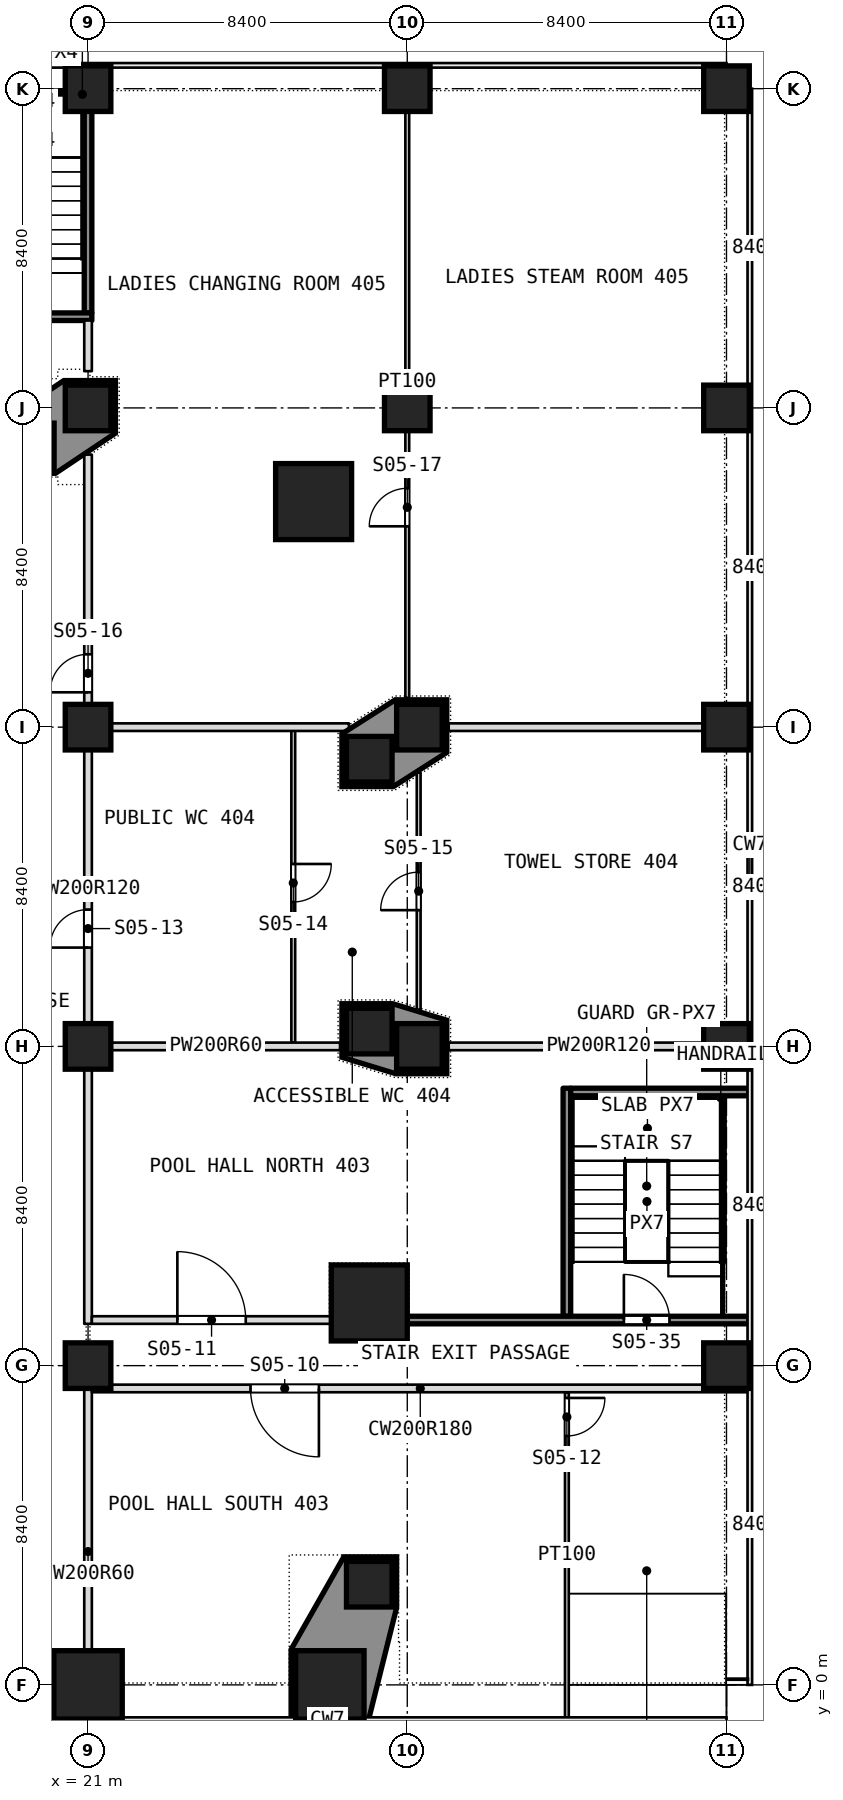
"""IFC4 building model, lengths in metres.
Left out: names, types, materials, properties, quantities, classifications, styles, units other than length and angle.
Written with IfcOpenShell. Run it as: python <this file> out.ifc"""

import sys

from ifc_helpers import new_model, si_unit, direction, frame, frame_2d, origin, origin_2d, place, context, subcontext, project, spatial, polyline, rectangle, outline, extrude, element, fill, save


model = new_model("IFC4")
c1 = context("Model", 3, precision=1e-05, world=origin(), true_north=direction((0.0, 1.0)))
c2 = subcontext(c1, "Body", "Model", "MODEL_VIEW")
j1 = project(units=[si_unit("LENGTHUNIT", "METRE"), si_unit("PLANEANGLEUNIT", "RADIAN")], contexts=[c1])
p1 = place(None, origin())
s1 = spatial("IfcSite", under=j1, at=p1, CompositionType="ELEMENT")
p2 = place(p1, origin())
s2 = spatial("IfcBuilding", under=s1, at=p2, CompositionType="ELEMENT")
p3 = place(p2, frame((0.0, 0.0, 26.0)))
s3 = spatial("IfcBuildingStorey", under=s2, at=p3, CompositionType="ELEMENT", Elevation=26.0)
p4 = place(p3, frame((21.0, 0.0, 0.0), z_axis=(0.0, 0.0, 1.0), x_axis=(1.0, 0.0, 0.0)))
e1 = element("IfcColumn", 1, at=p4, inside=s3, PredefinedType="COLUMN", context=c2, shape_type="SweptSolid", body=[
    extrude(rectangle(XDim=1.8, YDim=1.8, at=origin_2d()), origin(), (0.0, 0.0, 1.0), 5.0),
])
for number, where, z_axis, x_axis in (
    (2, (21.0, 8.4, 0.0), (0.0, 0.0, 1.0), (1.0, 0.0, 0.0)),
    (3, (37.8, 8.4, 0.0), (0.0, 0.0, 1.0), (1.0, 0.0, 0.0)),
    (4, (21.0, 16.8, 0.0), (0.0, 0.0, 1.0), (1.0, 0.0, 0.0)),
    (5, (29.72, 16.8, 0.0), (0.0, 0.0, 1.0), (1.0, 0.0, 0.0)),
    (6, (37.8, 16.8, 0.0), (0.0, 0.0, 1.0), (1.0, 0.0, 0.0)),
    (7, (21.0, 25.2, 0.0), (0.0, 0.0, 1.0), (1.0, 0.0, 0.0)),
    (8, (29.72, 25.2, 0.0), (0.0, 0.0, 1.0), (1.0, 0.0, 0.0)),
    (9, (37.8, 25.2, 0.0), (0.0, 0.0, 1.0), (1.0, 0.0, 0.0)),
    (10, (21.0, 33.6, 0.0), (0.0, 0.0, 1.0), (1.0, 0.0, 0.0)),
    (11, (29.4, 33.6, 0.0), (0.0, 0.0, 1.0), (1.0, 0.0, 0.0)),
    (12, (37.8, 33.6, 0.0), (0.0, 0.0, 1.0), (1.0, 0.0, 0.0)),
    (13, (21.0, 42.0, 0.0), (0.0, 0.0, 1.0), (1.0, 0.0, 0.0)),
    (14, (29.4, 42.0, 0.0), (0.0, 0.0, 1.0), (1.0, 0.0, 0.0)),
    (15, (37.8, 42.0, 0.0), (0.0, 0.0, 1.0), (1.0, 0.0, 0.0)),
):
    element("IfcColumn", number, at=place(p3, frame(where, z_axis=z_axis, x_axis=x_axis)), inside=s3, PredefinedType="COLUMN", context=c2, shape_type="SweptSolid", body=[
        extrude(rectangle(XDim=1.2, YDim=1.2, at=origin_2d()), origin(), (0.0, 0.0, 1.0), 5.0),
    ])
p5 = place(p3, frame((27.363, 0.0, 0.0), z_axis=(0.0, 0.0, 1.0), x_axis=(1.0, 0.0, 0.0)))
e16 = element("IfcColumn", 16, at=p5, inside=s3, PredefinedType="COLUMN", context=c2, shape_type="SweptSolid", body=[
    extrude(rectangle(XDim=1.8, YDim=1.8, at=origin_2d()), origin(), (0.0, 0.0, 1.0), 5.0),
])
for number, where, z_axis, x_axis in (
    (17, (28.4, 10.05, 0.0), (0.0, 0.0, 1.0), (1.0, 0.0, 0.0)),
    (18, (26.936, 31.135, 0.0), (0.0, 0.0, 1.0), (1.0, 0.0, 0.0)),
):
    element("IfcColumn", number, at=place(p3, frame(where, z_axis=z_axis, x_axis=x_axis)), inside=s3, PredefinedType="COLUMN", context=c2, shape_type="SweptSolid", body=[
        extrude(rectangle(XDim=2.0, YDim=2.0, at=origin_2d()), origin(), (0.0, 0.0, 1.0), 5.0),
    ])
p6 = place(p3, frame((37.8, 2.4, 0.0), z_axis=(1.0, 0.0, 0.0), x_axis=(0.0, 0.0, 1.0)))
e19 = element("IfcWall", 19, at=p6, inside=s3, PredefinedType="SOLIDWALL", context=c2, shape_type="SweptSolid", body=[
    extrude(outline(polyline([(0.0, 0.0), (4.68, 0.0), (4.68, 21.6), (0.0, 21.6), (0.0, 16.321), (0.541, 15.6), (1.199, 14.4), (1.65, 13.2), (1.913, 12.0), (2.0, 10.8), (1.913, 9.6), (1.65, 8.4), (1.199, 7.2), (0.541, 6.0), (0.0, 5.279), (0.0, 0.0)])), origin(), (0.0, 0.0, -1.0), 4.2),
])
for number, where, z_axis, x_axis in (
    (20, (19.507, 32.6, 0.0), (0.0, 0.0, 1.0), (1.0, 0.0, 0.0)),
    (21, (28.4, 24.356, 0.0), (0.0, 0.0, 1.0), (1.0, 0.0, 0.0)),
    (22, (28.4, 17.203, 0.0), (0.0, 0.0, 1.0), (1.0, 0.0, 0.0)),
    (23, (28.4, 2.649, 0.0), (0.0, 0.0, 1.0), (1.0, 0.0, 0.0)),
):
    element("IfcColumn", number, at=place(p3, frame(where, z_axis=z_axis, x_axis=x_axis)), inside=s3, PredefinedType="COLUMN", context=c2, shape_type="SweptSolid", body=[
        extrude(rectangle(XDim=1.2, YDim=1.2, at=origin_2d()), origin(), (0.0, 0.0, 1.0), 5.0),
    ])
p7 = place(p3, frame((33.6, 9.7, 0.0), z_axis=(0.0, 0.0, 1.0), x_axis=(0.0, 1.0, 0.0)))
e24 = element("IfcWall", 24, at=p7, inside=s3, PredefinedType="PARTITIONING", context=c2, shape_type="SweptSolid", body=[
    extrude(rectangle(XDim=6.0, YDim=0.2, at=frame_2d((3.0, 0.0))), origin(), (0.0, 0.0, 1.0), 4.68),
])
p8 = place(p3, frame((33.6, -0.884, 0.0), z_axis=(0.0, 0.0, 1.0), x_axis=(0.0, 1.0, 0.0)))
e25 = element("IfcWall", 25, at=p8, inside=s3, PredefinedType="PARTITIONING", context=c2, shape_type="SweptSolid", body=[
    extrude(rectangle(XDim=8.584, YDim=0.1, at=frame_2d((4.292, 0.0))), origin(), (0.0, 0.0, 1.0), 4.68),
])
p9 = place(p8, frame((7.434, 0.0, 0.0)))
e26 = element("IfcOpeningElement", 26, at=p9, cuts=e25, PredefinedType="OPENING", context=c2, shape_type="SweptSolid", body=[
    extrude(rectangle(XDim=1.0, YDim=2.1, at=frame_2d((0.5, 1.05))), frame((0.0, 0.05, 0.0), z_axis=(0.0, -1.0, 0.0), x_axis=(1.0, 0.0, 0.0)), (0.0, 0.0, 1.0), 0.1),
])
p10 = place(p3, frame((29.7, 17.767, 0.0), z_axis=(0.0, 0.0, 1.0), x_axis=(0.0, 1.0, 0.0)))
e27 = element("IfcWall", 27, at=p10, inside=s3, PredefinedType="PARTITIONING", context=c2, shape_type="SweptSolid", body=[
    extrude(rectangle(XDim=6.235, YDim=0.1, at=frame_2d((3.117, 0.0))), origin(), (0.0, 0.0, 1.0), 4.68),
])
p11 = place(p10, frame((2.618, 0.0, 0.0)))
e28 = element("IfcOpeningElement", 28, at=p11, cuts=e27, PredefinedType="OPENING", context=c2, shape_type="SweptSolid", body=[
    extrude(rectangle(XDim=1.0, YDim=2.1, at=frame_2d((0.5, 1.05))), frame((0.0, 0.05, 0.0), z_axis=(0.0, -1.0, 0.0), x_axis=(1.0, 0.0, 0.0)), (0.0, 0.0, 1.0), 0.1),
])
p12 = place(p3, frame((29.4, 25.97, 0.0), z_axis=(0.0, 0.0, 1.0), x_axis=(0.0, 1.0, 0.0)))
e29 = element("IfcWall", 29, at=p12, inside=s3, PredefinedType="PARTITIONING", context=c2, shape_type="SweptSolid", body=[
    extrude(rectangle(XDim=16.614, YDim=0.1, at=frame_2d((8.307, 0.0))), origin(), (0.0, 0.0, 1.0), 4.68),
])
p13 = place(p12, frame((4.515, 0.0, 0.0)))
e30 = element("IfcOpeningElement", 30, at=p13, cuts=e29, PredefinedType="OPENING", context=c2, shape_type="SweptSolid", body=[
    extrude(rectangle(XDim=1.0, YDim=2.1, at=frame_2d((0.5, 1.05))), frame((0.0, 0.05, 0.0), z_axis=(0.0, -1.0, 0.0), x_axis=(1.0, 0.0, 0.0)), (0.0, 0.0, 1.0), 0.1),
])
p14 = place(p3, frame((26.4, 16.9, 0.0), z_axis=(0.0, 0.0, 1.0), x_axis=(0.0, 1.0, 0.0)))
e31 = element("IfcWall", 31, at=p14, inside=s3, PredefinedType="PARTITIONING", context=c2, shape_type="SweptSolid", body=[
    extrude(rectangle(XDim=8.4, YDim=0.1, at=frame_2d((4.2, 0.0))), origin(), (0.0, 0.0, 1.0), 4.68),
])
p15 = place(p14, frame((3.7, 0.0, 0.0)))
e32 = element("IfcOpeningElement", 32, at=p15, cuts=e31, PredefinedType="OPENING", context=c2, shape_type="SweptSolid", body=[
    extrude(rectangle(XDim=1.0, YDim=2.1, at=frame_2d((0.5, 1.05))), frame((0.0, 0.05, 0.0), z_axis=(0.0, -1.0, 0.0), x_axis=(1.0, 0.0, 0.0)), (0.0, 0.0, 1.0), 0.1),
])
p16 = place(p3, frame((21.0, -0.884, 0.0), z_axis=(0.0, 0.0, 1.0), x_axis=(0.0, 1.0, 0.0)))
e33 = element("IfcWall", 33, at=p16, inside=s3, PredefinedType="PARTITIONING", context=c2, shape_type="SweptSolid", body=[
    extrude(rectangle(XDim=8.784, YDim=0.2, at=frame_2d((4.392, 0.0))), origin(), (0.0, 0.0, 1.0), 4.68),
])
p17 = place(p3, frame((21.0, 9.5, 0.0), z_axis=(0.0, 0.0, 1.0), x_axis=(0.0, 1.0, 0.0)))
e34 = element("IfcWall", 34, at=p17, inside=s3, PredefinedType="PARTITIONING", context=c2, shape_type="SweptSolid", body=[
    extrude(rectangle(XDim=22.871, YDim=0.2, at=frame_2d((11.436, 0.0))), origin(), (0.0, 0.0, 1.0), 4.68),
])
p18 = place(p17, frame((9.9, 0.0, 0.0)))
e35 = element("IfcOpeningElement", 35, at=p18, cuts=e34, PredefinedType="OPENING", context=c2, shape_type="SweptSolid", body=[
    extrude(rectangle(XDim=1.0, YDim=2.1, at=frame_2d((0.5, 1.05))), frame((0.0, 0.1, 0.0), z_axis=(0.0, -1.0, 0.0), x_axis=(1.0, 0.0, 0.0)), (0.0, 0.0, 1.0), 0.2),
])
p19 = place(p17, frame((16.617, 0.0, 0.0)))
e36 = element("IfcOpeningElement", 36, at=p19, cuts=e34, PredefinedType="OPENING", context=c2, shape_type="SweptSolid", body=[
    extrude(rectangle(XDim=1.0, YDim=2.1, at=frame_2d((0.5, 1.05))), frame((0.0, 0.1, 0.0), z_axis=(0.0, -1.0, 0.0), x_axis=(1.0, 0.0, 0.0)), (0.0, 0.0, 1.0), 0.2),
])
p20 = place(p3, frame((21.0, 34.567, 0.0), z_axis=(0.0, 0.0, 1.0), x_axis=(0.0, 1.0, 0.0)))
e37 = element("IfcWall", 37, at=p20, inside=s3, PredefinedType="PARTITIONING", context=c2, shape_type="SweptSolid", body=[
    extrude(rectangle(XDim=1.333, YDim=0.2, at=frame_2d((0.667, 0.0))), origin(), (0.0, 0.0, 1.0), 4.68),
])
p21 = place(p3, frame((21.0, 36.1, 0.0), z_axis=(0.0, 0.0, 1.0), x_axis=(0.0, 1.0, 0.0)))
e38 = element("IfcWall", 38, at=p21, inside=s3, PredefinedType="PARTITIONING", context=c2, shape_type="SweptSolid", body=[
    extrude(rectangle(XDim=6.484, YDim=0.2, at=frame_2d((3.242, 0.0))), origin(), (0.0, 0.0, 1.0), 4.68),
])
p22 = place(p3, frame((21.1, 7.8, 0.0), z_axis=(0.0, 0.0, 1.0), x_axis=(1.0, 0.0, 0.0)))
e39 = element("IfcWall", 39, at=p22, inside=s3, PredefinedType="PARTITIONING", context=c2, shape_type="SweptSolid", body=[
    extrude(rectangle(XDim=17.284, YDim=0.2, at=frame_2d((8.642, 0.0))), origin(), (0.0, 0.0, 1.0), 4.68),
])
p23 = place(p22, frame((4.175, 0.0, 0.0)))
e40 = element("IfcOpeningElement", 40, at=p23, cuts=e39, PredefinedType="OPENING", context=c2, shape_type="SweptSolid", body=[
    extrude(rectangle(XDim=1.8, YDim=2.1, at=frame_2d((0.9, 1.05))), frame((0.0, 0.1, 0.0), z_axis=(0.0, -1.0, 0.0), x_axis=(1.0, 0.0, 0.0)), (0.0, 0.0, 1.0), 0.2),
])
p24 = place(p3, frame((21.1, 9.6, 0.0), z_axis=(0.0, 0.0, 1.0), x_axis=(1.0, 0.0, 0.0)))
e41 = element("IfcWall", 41, at=p24, inside=s3, PredefinedType="PARTITIONING", context=c2, shape_type="SweptSolid", body=[
    extrude(rectangle(XDim=6.3, YDim=0.2, at=frame_2d((3.15, 0.0))), origin(), (0.0, 0.0, 1.0), 4.68),
])
p25 = place(p24, frame((2.25, 0.0, 0.0)))
e42 = element("IfcOpeningElement", 42, at=p25, cuts=e41, PredefinedType="OPENING", context=c2, shape_type="SweptSolid", body=[
    extrude(rectangle(XDim=1.8, YDim=2.1, at=frame_2d((0.9, 1.05))), frame((0.0, 0.1, 0.0), z_axis=(0.0, -1.0, 0.0), x_axis=(1.0, 0.0, 0.0)), (0.0, 0.0, 1.0), 0.2),
])
p26 = place(p3, frame((29.4, 9.6, 0.0), z_axis=(0.0, 0.0, 1.0), x_axis=(1.0, 0.0, 0.0)))
e43 = element("IfcWall", 43, at=p26, inside=s3, PredefinedType="PARTITIONING", context=c2, shape_type="SweptSolid", body=[
    extrude(rectangle(XDim=8.984, YDim=0.2, at=frame_2d((4.492, 0.0))), origin(), (0.0, 0.0, 1.0), 4.68),
])
p27 = place(p26, frame((5.7, 0.0, 0.0)))
e44 = element("IfcOpeningElement", 44, at=p27, cuts=e43, PredefinedType="OPENING", context=c2, shape_type="SweptSolid", body=[
    extrude(rectangle(XDim=1.2, YDim=2.1, at=frame_2d((0.6, 1.05))), frame((0.0, 0.1, 0.0), z_axis=(0.0, -1.0, 0.0), x_axis=(1.0, 0.0, 0.0)), (0.0, 0.0, 1.0), 0.2),
])
p28 = place(p3, frame((33.7, 15.6, 0.0), z_axis=(0.0, 0.0, 1.0), x_axis=(1.0, 0.0, 0.0)))
e45 = element("IfcWall", 45, at=p28, inside=s3, PredefinedType="PARTITIONING", context=c2, shape_type="SweptSolid", body=[
    extrude(rectangle(XDim=4.684, YDim=0.2, at=frame_2d((2.342, 0.0))), origin(), (0.0, 0.0, 1.0), 4.68),
])
p29 = place(p3, frame((21.1, 16.8, 0.0), z_axis=(0.0, 0.0, 1.0), x_axis=(1.0, 0.0, 0.0)))
e46 = element("IfcWall", 46, at=p29, inside=s3, PredefinedType="PARTITIONING", context=c2, shape_type="SweptSolid", body=[
    extrude(rectangle(XDim=6.53, YDim=0.2, at=frame_2d((3.265, 0.0))), origin(), (0.0, 0.0, 1.0), 4.68),
])
p30 = place(p3, frame((30.49, 16.8, 0.0), z_axis=(0.0, 0.0, 1.0), x_axis=(1.0, 0.0, 0.0)))
e47 = element("IfcWall", 47, at=p30, inside=s3, PredefinedType="PARTITIONING", context=c2, shape_type="SweptSolid", body=[
    extrude(rectangle(XDim=7.894, YDim=0.2, at=frame_2d((3.947, 0.0))), origin(), (0.0, 0.0, 1.0), 4.68),
])
p31 = place(p3, frame((21.1, 25.2, 0.0), z_axis=(0.0, 0.0, 1.0), x_axis=(1.0, 0.0, 0.0)))
e48 = element("IfcWall", 48, at=p31, inside=s3, PredefinedType="PARTITIONING", context=c2, shape_type="SweptSolid", body=[
    extrude(rectangle(XDim=6.765, YDim=0.2, at=frame_2d((3.382, 0.0))), origin(), (0.0, 0.0, 1.0), 4.68),
])
p32 = place(p3, frame((30.49, 25.2, 0.0), z_axis=(0.0, 0.0, 1.0), x_axis=(1.0, 0.0, 0.0)))
e49 = element("IfcWall", 49, at=p32, inside=s3, PredefinedType="PARTITIONING", context=c2, shape_type="SweptSolid", body=[
    extrude(rectangle(XDim=7.894, YDim=0.2, at=frame_2d((3.947, 0.0))), origin(), (0.0, 0.0, 1.0), 4.68),
])
p33 = place(p3, frame((16.7, 36.0, 0.0), z_axis=(0.0, 0.0, 1.0), x_axis=(1.0, 0.0, 0.0)))
e50 = element("IfcWall", 50, at=p33, inside=s3, PredefinedType="PARTITIONING", context=c2, shape_type="SweptSolid", body=[
    extrude(rectangle(XDim=4.4, YDim=0.2, at=frame_2d((2.2, 0.0))), origin(), (0.0, 0.0, 1.0), 4.68),
])
p34 = place(p33, frame((1.6, 0.0, 0.0)))
e51 = element("IfcOpeningElement", 51, at=p34, cuts=e50, PredefinedType="OPENING", context=c2, shape_type="SweptSolid", body=[
    extrude(rectangle(XDim=1.2, YDim=2.1, at=frame_2d((0.6, 1.05))), frame((0.0, 0.1, 0.0), z_axis=(0.0, -1.0, 0.0), x_axis=(1.0, 0.0, 0.0)), (0.0, 0.0, 1.0), 0.2),
])
p35 = place(p3, origin())
e52 = element("IfcWall", 52, at=p35, inside=s3, PredefinedType="SOLIDWALL", context=c2, shape_type="SweptSolid", body=[
    extrude(outline(polyline([(20.364, 34.32), (21.72, 34.32), (21.72, 32.936), (20.143, 31.88), (18.787, 31.88), (18.787, 33.264), (20.364, 34.32)]), holes=[polyline([(21.6, 33.0), (21.6, 34.2), (20.4, 34.2), (20.4, 33.0), (21.6, 33.0)]), polyline([(20.107, 32.0), (20.107, 33.2), (18.907, 33.2), (18.907, 32.0), (20.107, 32.0)])]), origin(), (0.0, 0.0, 1.0), 5.0),
])
p36 = place(p3, origin())
e53 = element("IfcWall", 53, at=p36, inside=s3, PredefinedType="SOLIDWALL", context=c2, shape_type="SweptSolid", body=[
    extrude(outline(polyline([(27.68, 25.022), (29.085, 25.92), (30.44, 25.92), (30.44, 24.534), (29.035, 23.636), (27.68, 23.636), (27.68, 25.022)]), holes=[polyline([(29.12, 24.6), (30.32, 24.6), (30.32, 25.8), (29.12, 25.8), (29.12, 24.6)]), polyline([(27.8, 23.756), (29.0, 23.756), (29.0, 24.956), (27.8, 24.956), (27.8, 23.756)])]), origin(), (0.0, 0.0, 1.0), 5.0),
])
p37 = place(p3, origin())
e54 = element("IfcWall", 54, at=p37, inside=s3, PredefinedType="SOLIDWALL", context=c2, shape_type="SweptSolid", body=[
    extrude(outline(polyline([(27.68, 16.514), (27.68, 17.923), (29.018, 17.923), (30.44, 17.489), (30.44, 16.08), (29.102, 16.08), (27.68, 16.514)]), holes=[polyline([(29.12, 16.2), (30.32, 16.2), (30.32, 17.4), (29.12, 17.4), (29.12, 16.2)]), polyline([(27.8, 16.603), (29.0, 16.603), (29.0, 17.803), (27.8, 17.803), (27.8, 16.603)])]), origin(), (0.0, 0.0, 1.0), 5.0),
])
p38 = place(p3, origin())
e55 = element("IfcWall", 55, at=p38, inside=s3, PredefinedType="SOLIDWALL", context=c2, shape_type="SweptSolid", body=[
    extrude(outline(polyline([(26.343, 0.932), (27.73, 3.369), (29.12, 3.369), (29.12, 2.034), (28.357, -1.02), (26.343, -1.02), (26.343, 0.932)]), holes=[polyline([(27.8, 2.049), (29.0, 2.049), (29.0, 3.249), (27.8, 3.249), (27.8, 2.049)]), polyline([(26.463, -0.9), (28.263, -0.9), (28.263, 0.9), (26.463, 0.9), (26.463, -0.9)])]), origin(), (0.0, 0.0, 1.0), 5.0),
])
p39 = place(p23, origin())
e56 = element("IfcDoor", 56, at=p39, inside=s3, OperationType="DOUBLE_DOOR_SINGLE_SWING", PredefinedType="DOOR", context=c2, shape_type="SweptSolid", body=[
    extrude(rectangle(XDim=1.8, YDim=2.1, at=frame_2d((0.9, 1.05))), frame((0.0, 0.025, 0.0), z_axis=(0.0, -1.0, 0.0), x_axis=(1.0, 0.0, 0.0)), (0.0, 0.0, 1.0), 0.05),
])
fill(e40, e56)
p40 = place(p25, origin())
e57 = element("IfcDoor", 57, at=p40, inside=s3, OperationType="DOUBLE_DOOR_SINGLE_SWING", PredefinedType="DOOR", context=c2, shape_type="SweptSolid", body=[
    extrude(rectangle(XDim=1.8, YDim=2.1, at=frame_2d((0.9, 1.05))), frame((0.0, 0.025, 0.0), z_axis=(0.0, -1.0, 0.0), x_axis=(1.0, 0.0, 0.0)), (0.0, 0.0, 1.0), 0.05),
])
fill(e42, e57)
p41 = place(p9, origin())
e58 = element("IfcDoor", 58, at=p41, inside=s3, OperationType="SINGLE_SWING_LEFT", PredefinedType="DOOR", context=c2, shape_type="SweptSolid", body=[
    extrude(rectangle(XDim=1.0, YDim=2.1, at=frame_2d((0.5, 1.05))), frame((0.0, 0.025, 0.0), z_axis=(0.0, -1.0, 0.0), x_axis=(1.0, 0.0, 0.0)), (0.0, 0.0, 1.0), 0.05),
])
fill(e26, e58)
p42 = place(p18, origin())
e59 = element("IfcDoor", 59, at=p42, inside=s3, OperationType="SINGLE_SWING_RIGHT", PredefinedType="DOOR", context=c2, shape_type="SweptSolid", body=[
    extrude(rectangle(XDim=1.0, YDim=2.1, at=frame_2d((0.5, 1.05))), frame((0.0, 0.025, 0.0), z_axis=(0.0, -1.0, 0.0), x_axis=(1.0, 0.0, 0.0)), (0.0, 0.0, 1.0), 0.05),
])
fill(e35, e59)
p43 = place(p15, origin())
e60 = element("IfcDoor", 60, at=p43, inside=s3, OperationType="SINGLE_SWING_LEFT", PredefinedType="DOOR", context=c2, shape_type="SweptSolid", body=[
    extrude(rectangle(XDim=1.0, YDim=2.1, at=frame_2d((0.5, 1.05))), frame((0.0, 0.025, 0.0), z_axis=(0.0, -1.0, 0.0), x_axis=(1.0, 0.0, 0.0)), (0.0, 0.0, 1.0), 0.05),
])
fill(e32, e60)
p44 = place(p11, origin())
e61 = element("IfcDoor", 61, at=p44, inside=s3, OperationType="SINGLE_SWING_LEFT", PredefinedType="DOOR", context=c2, shape_type="SweptSolid", body=[
    extrude(rectangle(XDim=1.0, YDim=2.1, at=frame_2d((0.5, 1.05))), frame((0.0, 0.025, 0.0), z_axis=(0.0, -1.0, 0.0), x_axis=(1.0, 0.0, 0.0)), (0.0, 0.0, 1.0), 0.05),
])
fill(e28, e61)
p45 = place(p19, origin())
e62 = element("IfcDoor", 62, at=p45, inside=s3, OperationType="SINGLE_SWING_RIGHT", PredefinedType="DOOR", context=c2, shape_type="SweptSolid", body=[
    extrude(rectangle(XDim=1.0, YDim=2.1, at=frame_2d((0.5, 1.05))), frame((0.0, 0.025, 0.0), z_axis=(0.0, -1.0, 0.0), x_axis=(1.0, 0.0, 0.0)), (0.0, 0.0, 1.0), 0.05),
])
fill(e36, e62)
p46 = place(p13, origin())
e63 = element("IfcDoor", 63, at=p46, inside=s3, OperationType="SINGLE_SWING_LEFT", PredefinedType="DOOR", context=c2, shape_type="SweptSolid", body=[
    extrude(rectangle(XDim=1.0, YDim=2.1, at=frame_2d((0.5, 1.05))), frame((0.0, 0.025, 0.0), z_axis=(0.0, -1.0, 0.0), x_axis=(1.0, 0.0, 0.0)), (0.0, 0.0, 1.0), 0.05),
])
fill(e30, e63)
p47 = place(p27, origin())
e64 = element("IfcDoor", 64, at=p47, inside=s3, OperationType="SINGLE_SWING_LEFT", PredefinedType="DOOR", context=c2, shape_type="SweptSolid", body=[
    extrude(rectangle(XDim=1.2, YDim=2.1, at=frame_2d((0.6, 1.05))), frame((0.0, 0.025, 0.0), z_axis=(0.0, -1.0, 0.0), x_axis=(1.0, 0.0, 0.0)), (0.0, 0.0, 1.0), 0.05),
])
fill(e44, e64)
save(model, sys.argv[1])
